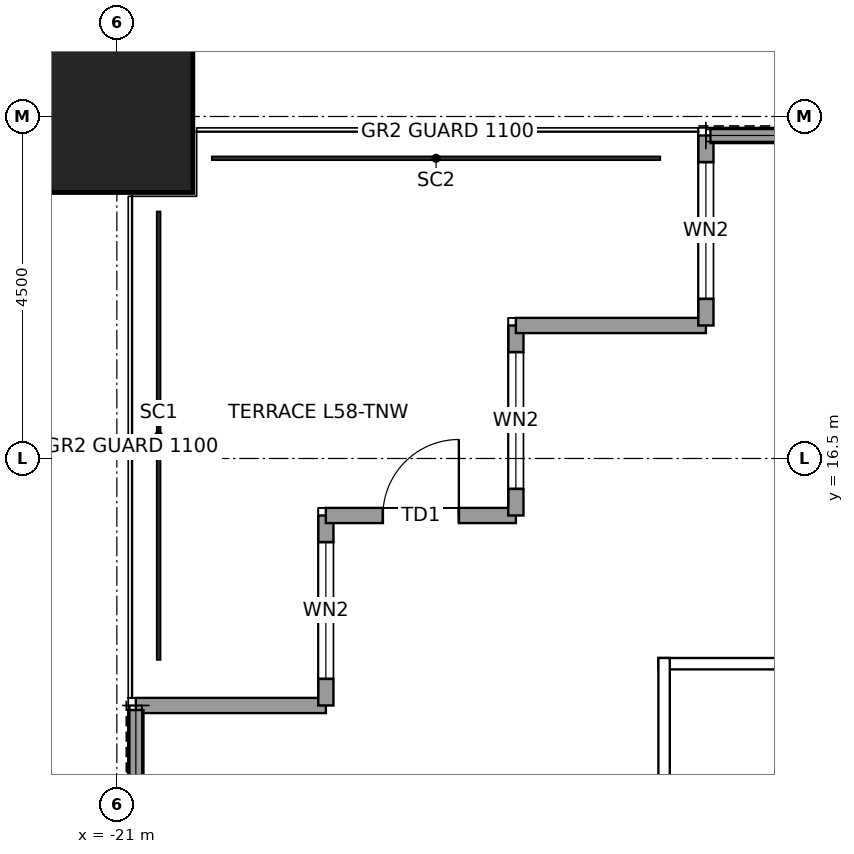
"""IFC4 building model, lengths in metres.
Left out: names, types, materials, properties, quantities, classifications, styles, units other than length and angle.
Written with IfcOpenShell. Run it as: python <this file> out.ifc"""

import sys

from ifc_helpers import new_model, si_unit, direction, frame, frame_2d, origin, origin_2d, place, context, subcontext, project, spatial, rectangle, hollow_rectangle, extrude, element, fill, save


model = new_model("IFC4")
c1 = context("Model", 3, precision=1e-05, world=origin(), true_north=direction((0.0, 1.0)))
c2 = subcontext(c1, "Body", "Model", "MODEL_VIEW")
j1 = project(units=[si_unit("LENGTHUNIT", "METRE"), si_unit("PLANEANGLEUNIT", "RADIAN")], contexts=[c1])
p1 = place(None, origin())
s1 = spatial("IfcSite", under=j1, at=p1, CompositionType="ELEMENT")
p2 = place(p1, origin())
s2 = spatial("IfcBuilding", under=s1, at=p2, CompositionType="ELEMENT")
p3 = place(p2, frame((0.0, 0.0, 267.9)))
s3 = spatial("IfcBuildingStorey", under=s2, at=p3, CompositionType="ELEMENT", Elevation=267.9)
p4 = place(p3, frame((-21.0, 21.0, 0.0), z_axis=(0.0, 0.0, 1.0), x_axis=(1.0, 0.0, 0.0)))
e1 = element("IfcColumn", 1, at=p4, inside=s3, PredefinedType="COLUMN", context=c2, shape_type="SweptSolid", body=[
    extrude(hollow_rectangle(XDim=2.0, YDim=2.0, WallThickness=0.095, at=origin_2d()), origin(), (0.0, 0.0, 1.0), 4.0),
])
p5 = place(p3, frame((-20.75, 13.25, 0.0), z_axis=(0.0, 0.0, 1.0), x_axis=(1.0, 0.0, 0.0)))
e2 = element("IfcWall", 2, at=p5, inside=s3, PredefinedType="SOLIDWALL", context=c2, shape_type="SweptSolid", body=[
    extrude(rectangle(XDim=2.5, YDim=0.2, at=frame_2d((1.25, 0.0))), origin(), (0.0, 0.0, 1.0), 3.85),
])
p6 = place(p3, frame((-18.25, 13.25, 0.0), z_axis=(0.0, 0.0, 1.0), x_axis=(0.0, 1.0, 0.0)))
e3 = element("IfcWall", 3, at=p6, inside=s3, PredefinedType="SOLIDWALL", context=c2, shape_type="SweptSolid", body=[
    extrude(rectangle(XDim=2.5, YDim=0.2, at=frame_2d((1.25, 0.0))), origin(), (0.0, 0.0, 1.0), 3.85),
])
p7 = place(p6, frame((0.35, 0.0, 0.3)))
e4 = element("IfcOpeningElement", 4, at=p7, cuts=e3, PredefinedType="OPENING", context=c2, shape_type="SweptSolid", body=[
    extrude(rectangle(XDim=1.8, YDim=2.4, at=frame_2d((0.9, 1.2))), frame((0.0, 0.11, 0.0), z_axis=(0.0, -1.0, 0.0), x_axis=(1.0, 0.0, 0.0)), (0.0, 0.0, 1.0), 0.22),
])
p8 = place(p3, frame((-18.25, 15.75, 0.0), z_axis=(0.0, 0.0, 1.0), x_axis=(1.0, 0.0, 0.0)))
e5 = element("IfcWall", 5, at=p8, inside=s3, PredefinedType="SOLIDWALL", context=c2, shape_type="SweptSolid", body=[
    extrude(rectangle(XDim=2.5, YDim=0.2, at=frame_2d((1.25, 0.0))), origin(), (0.0, 0.0, 1.0), 3.317),
])
p9 = place(p8, frame((0.75, 0.0, 0.0)))
e6 = element("IfcOpeningElement", 6, at=p9, cuts=e5, PredefinedType="OPENING", context=c2, shape_type="SweptSolid", body=[
    extrude(rectangle(XDim=1.0, YDim=2.4, at=frame_2d((0.5, 1.2))), frame((0.0, 0.11, 0.0), z_axis=(0.0, -1.0, 0.0), x_axis=(1.0, 0.0, 0.0)), (0.0, 0.0, 1.0), 0.22),
])
p10 = place(p3, frame((-15.75, 15.75, 0.0), z_axis=(0.0, 0.0, 1.0), x_axis=(0.0, 1.0, 0.0)))
e7 = element("IfcWall", 7, at=p10, inside=s3, PredefinedType="SOLIDWALL", context=c2, shape_type="SweptSolid", body=[
    extrude(rectangle(XDim=2.5, YDim=0.2, at=frame_2d((1.25, 0.0))), origin(), (0.0, 0.0, 1.0), 3.85),
])
p11 = place(p10, frame((0.35, 0.0, 0.3)))
e8 = element("IfcOpeningElement", 8, at=p11, cuts=e7, PredefinedType="OPENING", context=c2, shape_type="SweptSolid", body=[
    extrude(rectangle(XDim=1.8, YDim=2.4, at=frame_2d((0.9, 1.2))), frame((0.0, 0.11, 0.0), z_axis=(0.0, -1.0, 0.0), x_axis=(1.0, 0.0, 0.0)), (0.0, 0.0, 1.0), 0.22),
])
p12 = place(p3, frame((-15.75, 18.25, 0.0), z_axis=(0.0, 0.0, 1.0), x_axis=(1.0, 0.0, 0.0)))
e9 = element("IfcWall", 9, at=p12, inside=s3, PredefinedType="SOLIDWALL", context=c2, shape_type="SweptSolid", body=[
    extrude(rectangle(XDim=2.5, YDim=0.2, at=frame_2d((1.25, 0.0))), origin(), (0.0, 0.0, 1.0), 3.85),
])
p13 = place(p3, frame((-13.25, 18.25, 0.0), z_axis=(0.0, 0.0, 1.0), x_axis=(0.0, 1.0, 0.0)))
e10 = element("IfcWall", 10, at=p13, inside=s3, PredefinedType="SOLIDWALL", context=c2, shape_type="SweptSolid", body=[
    extrude(rectangle(XDim=2.5, YDim=0.2, at=frame_2d((1.25, 0.0))), origin(), (0.0, 0.0, 1.0), 3.85),
])
p14 = place(p13, frame((0.35, 0.0, 0.3)))
e11 = element("IfcOpeningElement", 11, at=p14, cuts=e10, PredefinedType="OPENING", context=c2, shape_type="SweptSolid", body=[
    extrude(rectangle(XDim=1.8, YDim=2.4, at=frame_2d((0.9, 1.2))), frame((0.0, 0.11, 0.0), z_axis=(0.0, -1.0, 0.0), x_axis=(1.0, 0.0, 0.0)), (0.0, 0.0, 1.0), 0.22),
])
for number, where, z_axis, x_axis in (
    (12, (-13.19, 20.75, 0.0), (0.0, 0.0, 1.0), (1.0, 0.0, 0.0)),
    (13, (-20.75, 10.405, 0.0), (0.0, 0.0, 1.0), (0.0, 1.0, 0.0)),
):
    element("IfcWall", number, at=place(p3, frame(where, z_axis=z_axis, x_axis=x_axis)), inside=s3, PredefinedType="SOLIDWALL", context=c2, shape_type="SweptSolid", body=[
        extrude(rectangle(XDim=2.785, YDim=0.2, at=frame_2d((1.393, 0.0))), origin(), (0.0, 0.0, 1.0), 3.85),
    ])
p15 = place(p3, frame((-13.875, 13.8, 0.0), z_axis=(0.0, 0.0, 1.0), x_axis=(1.0, 0.0, 0.0)))
e14 = element("IfcWall", 14, at=p15, inside=s3, PredefinedType="PARTITIONING", context=c2, shape_type="SweptSolid", body=[
    extrude(rectangle(XDim=27.75, YDim=0.15, at=frame_2d((13.875, 0.0))), origin(), (0.0, 0.0, 1.0), 3.85),
])
p16 = place(p15, frame((20.275, 0.0, 0.0)))
e15 = element("IfcOpeningElement", 15, at=p16, cuts=e14, PredefinedType="OPENING", context=c2, shape_type="SweptSolid", body=[
    extrude(rectangle(XDim=1.0, YDim=2.4, at=frame_2d((0.5, 1.2))), frame((0.0, 0.085, 0.0), z_axis=(0.0, -1.0, 0.0), x_axis=(1.0, 0.0, 0.0)), (0.0, 0.0, 1.0), 0.17),
])
p17 = place(p3, frame((-13.8, -13.875, 0.0), z_axis=(0.0, 0.0, 1.0), x_axis=(0.0, 1.0, 0.0)))
e16 = element("IfcWall", 16, at=p17, inside=s3, PredefinedType="PARTITIONING", context=c2, shape_type="SweptSolid", body=[
    extrude(rectangle(XDim=27.75, YDim=0.15, at=frame_2d((13.875, 0.0))), origin(), (0.0, 0.0, 1.0), 3.85),
])
p18 = place(p7, origin())
e17 = element("IfcWindow", 17, at=p18, inside=s3, PartitioningType="SINGLE_PANEL", PredefinedType="WINDOW", context=c2, shape_type="SweptSolid", body=[
    extrude(rectangle(XDim=1.8, YDim=2.4, at=frame_2d((0.9, 1.2))), frame((0.0, 0.03, 0.0), z_axis=(0.0, -1.0, 0.0), x_axis=(1.0, 0.0, 0.0)), (0.0, 0.0, 1.0), 0.06),
])
fill(e4, e17)
p19 = place(p9, origin())
e18 = element("IfcDoor", 18, at=p19, inside=s3, OperationType="SINGLE_SWING_RIGHT", PredefinedType="DOOR", context=c2, shape_type="SweptSolid", body=[
    extrude(rectangle(XDim=1.0, YDim=2.4, at=frame_2d((0.5, 1.2))), frame((0.0, 0.025, 0.0), z_axis=(0.0, -1.0, 0.0), x_axis=(1.0, 0.0, 0.0)), (0.0, 0.0, 1.0), 0.05),
])
fill(e6, e18)
p20 = place(p11, origin())
e19 = element("IfcWindow", 19, at=p20, inside=s3, PartitioningType="SINGLE_PANEL", PredefinedType="WINDOW", context=c2, shape_type="SweptSolid", body=[
    extrude(rectangle(XDim=1.8, YDim=2.4, at=frame_2d((0.9, 1.2))), frame((0.0, 0.03, 0.0), z_axis=(0.0, -1.0, 0.0), x_axis=(1.0, 0.0, 0.0)), (0.0, 0.0, 1.0), 0.06),
])
fill(e8, e19)
p21 = place(p14, origin())
e20 = element("IfcWindow", 20, at=p21, inside=s3, PartitioningType="SINGLE_PANEL", PredefinedType="WINDOW", context=c2, shape_type="SweptSolid", body=[
    extrude(rectangle(XDim=1.8, YDim=2.4, at=frame_2d((0.9, 1.2))), frame((0.0, 0.03, 0.0), z_axis=(0.0, -1.0, 0.0), x_axis=(1.0, 0.0, 0.0)), (0.0, 0.0, 1.0), 0.06),
])
fill(e11, e20)
save(model, sys.argv[1])
